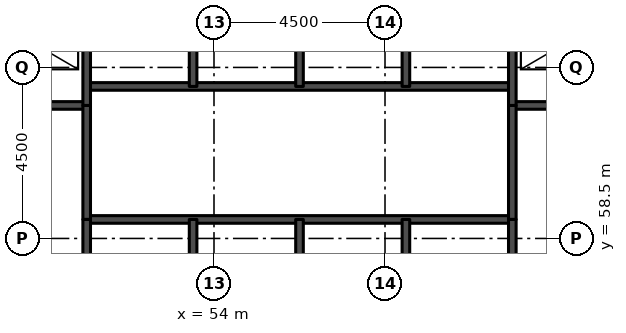
"""IFC4 building model, lengths in metres.
Left out: names, types, materials, properties, quantities, classifications, styles, units other than length and angle.
Written with IfcOpenShell. Run it as: python <this file> out.ifc"""

import sys

from ifc_helpers import new_model, si_unit, direction, frame, frame_2d, origin, place, context, subcontext, project, spatial, rectangle, extrude, element, save


model = new_model("IFC4")
c1 = context("Model", 3, precision=1e-05, world=origin(), true_north=direction((0.0, 1.0)))
c2 = subcontext(c1, "Body", "Model", "MODEL_VIEW")
j1 = project(units=[si_unit("LENGTHUNIT", "METRE"), si_unit("PLANEANGLEUNIT", "RADIAN")], contexts=[c1])
p1 = place(None, origin())
s1 = spatial("IfcSite", under=j1, at=p1, CompositionType="ELEMENT")
p2 = place(p1, origin())
s2 = spatial("IfcBuilding", under=s1, at=p2, CompositionType="ELEMENT")
p3 = place(p2, frame((0.0, 0.0, 39.6)))
s3 = spatial("IfcBuildingStorey", under=s2, at=p3, CompositionType="ELEMENT", Elevation=39.6)
p4 = place(p3, frame((50.65, 59.0, 0.0), z_axis=(0.0, 0.0, 1.0), x_axis=(1.0, 0.0, 0.0)))
e1 = element("IfcWall", 1, at=p4, inside=s3, PredefinedType="SOLIDWALL", context=c2, shape_type="SweptSolid", body=[
    extrude(rectangle(XDim=11.2, YDim=0.2, at=frame_2d((5.6, 0.0))), origin(), (0.0, 0.0, 1.0), 3.3),
])
for number, where, z_axis, x_axis in (
    (2, (45.5, 62.0, 0.0), (0.0, 0.0, 1.0), (1.0, 0.0, 0.0)),
    (3, (61.85, 62.0, 0.0), (0.0, 0.0, 1.0), (1.0, 0.0, 0.0)),
):
    element("IfcWall", number, at=place(p3, frame(where, z_axis=z_axis, x_axis=x_axis)), inside=s3, PredefinedType="SOLIDWALL", context=c2, shape_type="SweptSolid", body=[
        extrude(rectangle(XDim=5.15, YDim=0.2, at=frame_2d((2.575, 0.0))), origin(), (0.0, 0.0, 1.0), 3.08),
    ])
p5 = place(p3, frame((50.65, 62.5, 0.0), z_axis=(0.0, 0.0, 1.0), x_axis=(1.0, 0.0, 0.0)))
e4 = element("IfcWall", 4, at=p5, inside=s3, PredefinedType="SOLIDWALL", context=c2, shape_type="SweptSolid", body=[
    extrude(rectangle(XDim=11.2, YDim=0.2, at=frame_2d((5.6, 0.0))), origin(), (0.0, 0.0, 1.0), 3.3),
])
p6 = place(p3, frame((50.65, 59.0, 0.0), z_axis=(0.0, 0.0, 1.0), x_axis=(0.0, 1.0, 0.0)))
e5 = element("IfcWall", 5, at=p6, inside=s3, PredefinedType="SOLIDWALL", context=c2, shape_type="SweptSolid", body=[
    extrude(rectangle(XDim=3.0, YDim=0.2, at=frame_2d((1.5, 0.0))), origin(), (0.0, 0.0, 1.0), 3.3),
])
p7 = place(p3, frame((50.65, 56.2, 0.0), z_axis=(0.0, 0.0, 1.0), x_axis=(0.0, 1.0, 0.0)))
e6 = element("IfcWall", 6, at=p7, inside=s3, PredefinedType="SOLIDWALL", context=c2, shape_type="SweptSolid", body=[
    extrude(rectangle(XDim=2.8, YDim=0.2, at=frame_2d((1.4, 0.0))), origin(), (0.0, 0.0, 1.0), 3.08),
])
p8 = place(p3, frame((50.65, 62.0, 0.0), z_axis=(0.0, 0.0, 1.0), x_axis=(0.0, 1.0, 0.0)))
e7 = element("IfcWall", 7, at=p8, inside=s3, PredefinedType="SOLIDWALL", context=c2, shape_type="SweptSolid", body=[
    extrude(rectangle(XDim=3.3, YDim=0.2, at=frame_2d((1.65, 0.0))), origin(), (0.0, 0.0, 1.0), 3.08),
])
for number, where, z_axis, x_axis in (
    (8, (53.45, 56.2, 0.0), (0.0, 0.0, 1.0), (0.0, 1.0, 0.0)),
    (9, (53.45, 62.5, 0.0), (0.0, 0.0, 1.0), (0.0, 1.0, 0.0)),
    (10, (56.25, 56.2, 0.0), (0.0, 0.0, 1.0), (0.0, 1.0, 0.0)),
    (11, (56.25, 62.5, 0.0), (0.0, 0.0, 1.0), (0.0, 1.0, 0.0)),
    (12, (59.05, 56.2, 0.0), (0.0, 0.0, 1.0), (0.0, 1.0, 0.0)),
    (13, (59.05, 62.5, 0.0), (0.0, 0.0, 1.0), (0.0, 1.0, 0.0)),
):
    element("IfcWall", number, at=place(p3, frame(where, z_axis=z_axis, x_axis=x_axis)), inside=s3, PredefinedType="SOLIDWALL", context=c2, shape_type="SweptSolid", body=[
        extrude(rectangle(XDim=2.8, YDim=0.2, at=frame_2d((1.4, 0.0))), origin(), (0.0, 0.0, 1.0), 3.08),
    ])
p9 = place(p3, frame((61.85, 59.0, 0.0), z_axis=(0.0, 0.0, 1.0), x_axis=(0.0, 1.0, 0.0)))
e14 = element("IfcWall", 14, at=p9, inside=s3, PredefinedType="SOLIDWALL", context=c2, shape_type="SweptSolid", body=[
    extrude(rectangle(XDim=3.0, YDim=0.2, at=frame_2d((1.5, 0.0))), origin(), (0.0, 0.0, 1.0), 3.3),
])
p10 = place(p3, frame((61.85, 56.2, 0.0), z_axis=(0.0, 0.0, 1.0), x_axis=(0.0, 1.0, 0.0)))
e15 = element("IfcWall", 15, at=p10, inside=s3, PredefinedType="SOLIDWALL", context=c2, shape_type="SweptSolid", body=[
    extrude(rectangle(XDim=2.8, YDim=0.2, at=frame_2d((1.4, 0.0))), origin(), (0.0, 0.0, 1.0), 3.08),
])
p11 = place(p3, frame((61.85, 62.0, 0.0), z_axis=(0.0, 0.0, 1.0), x_axis=(0.0, 1.0, 0.0)))
e16 = element("IfcWall", 16, at=p11, inside=s3, PredefinedType="SOLIDWALL", context=c2, shape_type="SweptSolid", body=[
    extrude(rectangle(XDim=3.3, YDim=0.2, at=frame_2d((1.65, 0.0))), origin(), (0.0, 0.0, 1.0), 3.08),
])
save(model, sys.argv[1])
